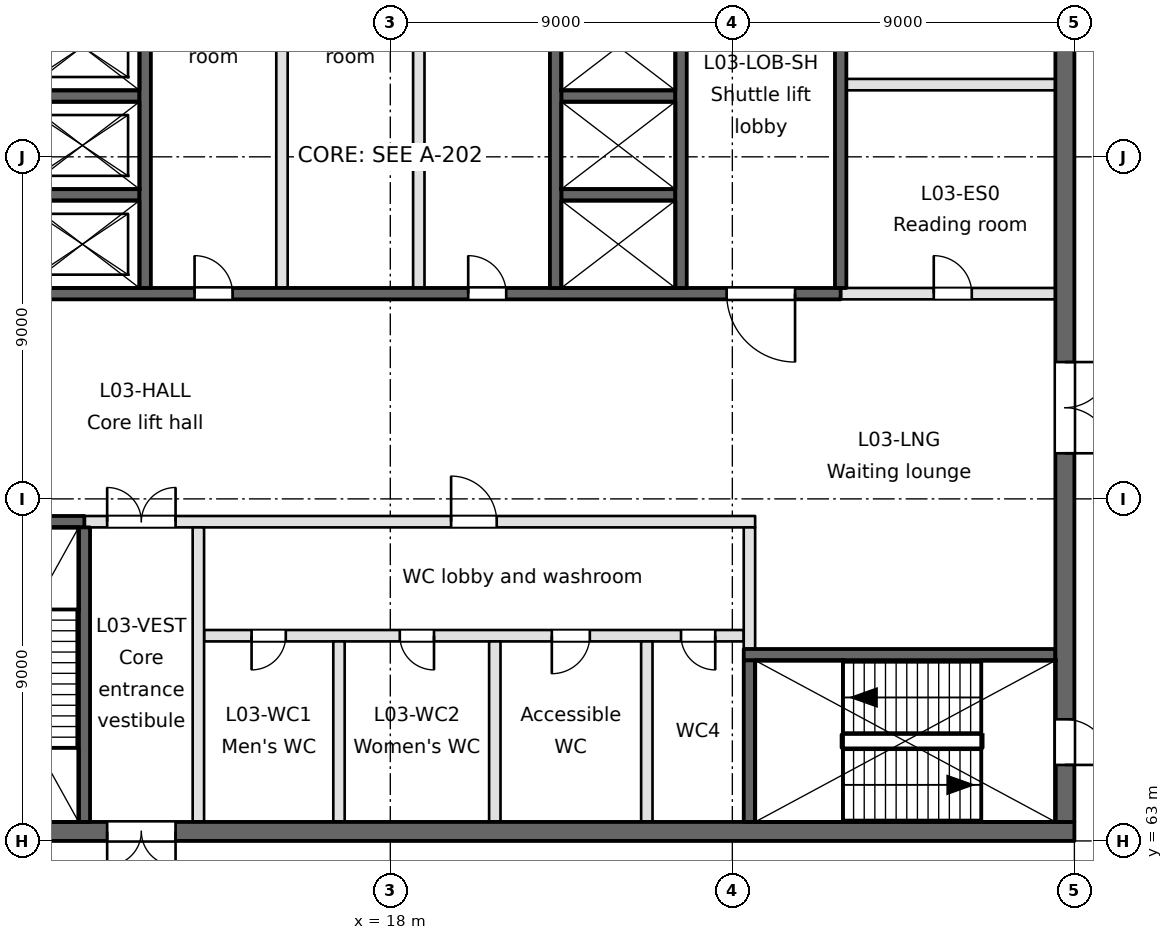
"""IFC4 building model, lengths in metres.
Left out: names, types, materials, properties, quantities, classifications, styles, units other than length and angle.
Written with IfcOpenShell. Run it as: python <this file> out.ifc"""

import sys

from ifc_helpers import new_model, si_unit, direction, frame, frame_2d, origin, place, context, subcontext, project, spatial, rectangle, extrude, element, fill, save


model = new_model("IFC4")
c1 = context("Model", 3, precision=1e-05, world=origin(), true_north=direction((0.0, 1.0)))
c2 = subcontext(c1, "Body", "Model", "MODEL_VIEW")
j1 = project(units=[si_unit("LENGTHUNIT", "METRE"), si_unit("PLANEANGLEUNIT", "RADIAN")], contexts=[c1])
p1 = place(None, origin())
s1 = spatial("IfcSite", under=j1, at=p1, CompositionType="ELEMENT")
p2 = place(p1, origin())
s2 = spatial("IfcBuilding", under=s1, at=p2, CompositionType="ELEMENT")
p3 = place(p2, frame((0.0, 0.0, 16.8)))
s3 = spatial("IfcBuildingStorey", under=s2, at=p3, CompositionType="ELEMENT", Elevation=16.8)
p4 = place(p3, frame((0.9, 63.25, -0.35), z_axis=(0.0, 0.0, 1.0), x_axis=(1.0, 0.0, 0.0)))
e1 = element("IfcWall", 1, at=p4, inside=s3, PredefinedType="SOLIDWALL", context=c2, shape_type="SweptSolid", body=[
    extrude(rectangle(XDim=35.1, YDim=0.5, at=frame_2d((17.55, 0.0))), origin(), (0.0, 0.0, 1.0), 4.8),
])
p5 = place(p4, frame((9.65, 0.0, 0.35)))
e2 = element("IfcOpeningElement", 2, at=p5, cuts=e1, PredefinedType="OPENING", context=c2, shape_type="SweptSolid", body=[
    extrude(rectangle(XDim=1.8, YDim=2.1, at=frame_2d((0.9, 1.05))), frame((0.0, 0.25, 0.0), z_axis=(0.0, -1.0, 0.0), x_axis=(1.0, 0.0, 0.0)), (0.0, 0.0, 1.0), 0.5),
])
p6 = place(p4, frame((1.55, 0.0, 0.35)))
e3 = element("IfcOpeningElement", 3, at=p6, cuts=e1, PredefinedType="OPENING", context=c2, shape_type="SweptSolid", body=[
    extrude(rectangle(XDim=1.2, YDim=2.1, at=frame_2d((0.6, 1.05))), frame((0.0, 0.25, 0.0), z_axis=(0.0, -1.0, 0.0), x_axis=(1.0, 0.0, 0.0)), (0.0, 0.0, 1.0), 0.5),
])
p7 = place(p4, frame((6.15, 0.0, 0.35)))
e4 = element("IfcOpeningElement", 4, at=p7, cuts=e1, PredefinedType="OPENING", context=c2, shape_type="SweptSolid", body=[
    extrude(rectangle(XDim=1.2, YDim=2.1, at=frame_2d((0.6, 1.05))), frame((0.0, 0.25, 0.0), z_axis=(0.0, -1.0, 0.0), x_axis=(1.0, 0.0, 0.0)), (0.0, 0.0, 1.0), 0.5),
])
p8 = place(p3, frame((27.3, 67.9, -0.35), z_axis=(0.0, 0.0, 1.0), x_axis=(1.0, 0.0, 0.0)))
e5 = element("IfcWall", 5, at=p8, inside=s3, PredefinedType="SOLIDWALL", context=c2, shape_type="SweptSolid", body=[
    extrude(rectangle(XDim=8.2, YDim=0.3, at=frame_2d((4.1, 0.0))), origin(), (0.0, 0.0, 1.0), 4.8),
])
p9 = place(p3, frame((13.1, 68.4, 0.0), z_axis=(0.0, 0.0, 1.0), x_axis=(1.0, 0.0, 0.0)))
e6 = element("IfcWall", 6, at=p9, inside=s3, PredefinedType="PARTITIONING", context=c2, shape_type="SweptSolid", body=[
    extrude(rectangle(XDim=14.2, YDim=0.3, at=frame_2d((7.1, 0.0))), origin(), (0.0, 0.0, 1.0), 4.45),
])
p10 = place(p9, frame((1.25, 0.0, 0.0)))
e7 = element("IfcOpeningElement", 7, at=p10, cuts=e6, PredefinedType="OPENING", context=c2, shape_type="SweptSolid", body=[
    extrude(rectangle(XDim=0.9, YDim=2.1, at=frame_2d((0.45, 1.05))), frame((0.0, 0.15, 0.0), z_axis=(0.0, -1.0, 0.0), x_axis=(1.0, 0.0, 0.0)), (0.0, 0.0, 1.0), 0.3),
])
p11 = place(p9, frame((5.15, 0.0, 0.0)))
e8 = element("IfcOpeningElement", 8, at=p11, cuts=e6, PredefinedType="OPENING", context=c2, shape_type="SweptSolid", body=[
    extrude(rectangle(XDim=0.9, YDim=2.1, at=frame_2d((0.45, 1.05))), frame((0.0, 0.15, 0.0), z_axis=(0.0, -1.0, 0.0), x_axis=(1.0, 0.0, 0.0)), (0.0, 0.0, 1.0), 0.3),
])
p12 = place(p9, frame((9.15, 0.0, 0.0)))
e9 = element("IfcOpeningElement", 9, at=p12, cuts=e6, PredefinedType="OPENING", context=c2, shape_type="SweptSolid", body=[
    extrude(rectangle(XDim=1.0, YDim=2.1, at=frame_2d((0.5, 1.05))), frame((0.0, 0.15, 0.0), z_axis=(0.0, -1.0, 0.0), x_axis=(1.0, 0.0, 0.0)), (0.0, 0.0, 1.0), 0.3),
])
p13 = place(p9, frame((12.55, 0.0, 0.0)))
e10 = element("IfcOpeningElement", 10, at=p13, cuts=e6, PredefinedType="OPENING", context=c2, shape_type="SweptSolid", body=[
    extrude(rectangle(XDim=0.9, YDim=2.1, at=frame_2d((0.45, 1.05))), frame((0.0, 0.15, 0.0), z_axis=(0.0, -1.0, 0.0), x_axis=(1.0, 0.0, 0.0)), (0.0, 0.0, 1.0), 0.3),
])
p14 = place(p3, frame((0.9, 71.4, -0.35), z_axis=(0.0, 0.0, 1.0), x_axis=(1.0, 0.0, 0.0)))
e11 = element("IfcWall", 11, at=p14, inside=s3, PredefinedType="SOLIDWALL", context=c2, shape_type="SweptSolid", body=[
    extrude(rectangle(XDim=9.05, YDim=0.3, at=frame_2d((4.525, 0.0))), origin(), (0.0, 0.0, 1.0), 4.8),
])
p15 = place(p3, frame((9.95, 71.4, 0.0), z_axis=(0.0, 0.0, 1.0), x_axis=(1.0, 0.0, 0.0)))
e12 = element("IfcWall", 12, at=p15, inside=s3, PredefinedType="PARTITIONING", context=c2, shape_type="SweptSolid", body=[
    extrude(rectangle(XDim=17.65, YDim=0.3, at=frame_2d((8.825, 0.0))), origin(), (0.0, 0.0, 1.0), 4.45),
])
p16 = place(p15, frame((0.6, 0.0, 0.0)))
e13 = element("IfcOpeningElement", 13, at=p16, cuts=e12, PredefinedType="OPENING", context=c2, shape_type="SweptSolid", body=[
    extrude(rectangle(XDim=1.8, YDim=2.1, at=frame_2d((0.9, 1.05))), frame((0.0, 0.15, 0.0), z_axis=(0.0, -1.0, 0.0), x_axis=(1.0, 0.0, 0.0)), (0.0, 0.0, 1.0), 0.3),
])
p17 = place(p15, frame((9.65, 0.0, 0.0)))
e14 = element("IfcOpeningElement", 14, at=p17, cuts=e12, PredefinedType="OPENING", context=c2, shape_type="SweptSolid", body=[
    extrude(rectangle(XDim=1.2, YDim=2.1, at=frame_2d((0.6, 1.05))), frame((0.0, 0.15, 0.0), z_axis=(0.0, -1.0, 0.0), x_axis=(1.0, 0.0, 0.0)), (0.0, 0.0, 1.0), 0.3),
])
p18 = place(p3, frame((0.9, 77.4, -0.35), z_axis=(0.0, 0.0, 1.0), x_axis=(1.0, 0.0, 0.0)))
e15 = element("IfcWall", 15, at=p18, inside=s3, PredefinedType="SOLIDWALL", context=c2, shape_type="SweptSolid", body=[
    extrude(rectangle(XDim=28.95, YDim=0.3, at=frame_2d((14.475, 0.0))), origin(), (0.0, 0.0, 1.0), 4.8),
])
p19 = place(p18, frame((4.35, 0.0, 0.35)))
e16 = element("IfcOpeningElement", 16, at=p19, cuts=e15, PredefinedType="OPENING", context=c2, shape_type="SweptSolid", body=[
    extrude(rectangle(XDim=1.8, YDim=2.1, at=frame_2d((0.9, 1.05))), frame((0.0, 0.15, 0.0), z_axis=(0.0, -1.0, 0.0), x_axis=(1.0, 0.0, 0.0)), (0.0, 0.0, 1.0), 0.3),
])
p20 = place(p18, frame((25.95, 0.0, 0.35)))
e17 = element("IfcOpeningElement", 17, at=p20, cuts=e15, PredefinedType="OPENING", context=c2, shape_type="SweptSolid", body=[
    extrude(rectangle(XDim=1.8, YDim=2.1, at=frame_2d((0.9, 1.05))), frame((0.0, 0.15, 0.0), z_axis=(0.0, -1.0, 0.0), x_axis=(1.0, 0.0, 0.0)), (0.0, 0.0, 1.0), 0.3),
])
p21 = place(p18, frame((11.95, 0.0, 0.35)))
e18 = element("IfcOpeningElement", 18, at=p21, cuts=e15, PredefinedType="OPENING", context=c2, shape_type="SweptSolid", body=[
    extrude(rectangle(XDim=1.0, YDim=2.1, at=frame_2d((0.5, 1.05))), frame((0.0, 0.15, 0.0), z_axis=(0.0, -1.0, 0.0), x_axis=(1.0, 0.0, 0.0)), (0.0, 0.0, 1.0), 0.3),
])
p22 = place(p18, frame((19.15, 0.0, 0.35)))
e19 = element("IfcOpeningElement", 19, at=p22, cuts=e15, PredefinedType="OPENING", context=c2, shape_type="SweptSolid", body=[
    extrude(rectangle(XDim=1.0, YDim=2.1, at=frame_2d((0.5, 1.05))), frame((0.0, 0.15, 0.0), z_axis=(0.0, -1.0, 0.0), x_axis=(1.0, 0.0, 0.0)), (0.0, 0.0, 1.0), 0.3),
])
p23 = place(p3, frame((29.85, 77.4, 0.0), z_axis=(0.0, 0.0, 1.0), x_axis=(1.0, 0.0, 0.0)))
e20 = element("IfcWall", 20, at=p23, inside=s3, PredefinedType="PARTITIONING", context=c2, shape_type="SweptSolid", body=[
    extrude(rectangle(XDim=5.65, YDim=0.3, at=frame_2d((2.825, 0.0))), origin(), (0.0, 0.0, 1.0), 4.45),
])
p24 = place(p23, frame((2.45, 0.0, 0.0)))
e21 = element("IfcOpeningElement", 21, at=p24, cuts=e20, PredefinedType="OPENING", context=c2, shape_type="SweptSolid", body=[
    extrude(rectangle(XDim=1.0, YDim=2.1, at=frame_2d((0.5, 1.05))), frame((0.0, 0.15, 0.0), z_axis=(0.0, -1.0, 0.0), x_axis=(1.0, 0.0, 0.0)), (0.0, 0.0, 1.0), 0.3),
])
for number, where, z_axis, x_axis in (
    (22, (8.4, 80.0, -0.35), (0.0, 0.0, 1.0), (1.0, 0.0, 0.0)),
    (23, (22.5, 80.0, -0.35), (0.0, 0.0, 1.0), (1.0, 0.0, 0.0)),
    (24, (8.4, 82.6, -0.35), (0.0, 0.0, 1.0), (1.0, 0.0, 0.0)),
    (25, (22.5, 82.6, -0.35), (0.0, 0.0, 1.0), (1.0, 0.0, 0.0)),
):
    element("IfcWall", number, at=place(p3, frame(where, z_axis=z_axis, x_axis=x_axis)), inside=s3, PredefinedType="SOLIDWALL", context=c2, shape_type="SweptSolid", body=[
        extrude(rectangle(XDim=3.0, YDim=0.3, at=frame_2d((1.5, 0.0))), origin(), (0.0, 0.0, 1.0), 4.8),
    ])
p25 = place(p3, frame((30.0, 82.9, 0.0), z_axis=(0.0, 0.0, 1.0), x_axis=(1.0, 0.0, 0.0)))
e26 = element("IfcWall", 26, at=p25, inside=s3, PredefinedType="PARTITIONING", context=c2, shape_type="SweptSolid", body=[
    extrude(rectangle(XDim=5.5, YDim=0.3, at=frame_2d((2.75, 0.0))), origin(), (0.0, 0.0, 1.0), 4.45),
])
p26 = place(p3, frame((9.95, 63.5, -0.35), z_axis=(0.0, 0.0, 1.0), x_axis=(0.0, 1.0, 0.0)))
e27 = element("IfcWall", 27, at=p26, inside=s3, PredefinedType="SOLIDWALL", context=c2, shape_type="SweptSolid", body=[
    extrude(rectangle(XDim=7.75, YDim=0.3, at=frame_2d((3.875, 0.0))), origin(), (0.0, 0.0, 1.0), 4.8),
])
p27 = place(p3, frame((11.55, 77.55, -0.35), z_axis=(0.0, 0.0, 1.0), x_axis=(0.0, 1.0, 0.0)))
e28 = element("IfcWall", 28, at=p27, inside=s3, PredefinedType="SOLIDWALL", context=c2, shape_type="SweptSolid", body=[
    extrude(rectangle(XDim=10.1, YDim=0.3, at=frame_2d((5.05, 0.0))), origin(), (0.0, 0.0, 1.0), 4.8),
])
p28 = place(p3, frame((12.95, 63.5, 0.0), z_axis=(0.0, 0.0, 1.0), x_axis=(0.0, 1.0, 0.0)))
e29 = element("IfcWall", 29, at=p28, inside=s3, PredefinedType="PARTITIONING", context=c2, shape_type="SweptSolid", body=[
    extrude(rectangle(XDim=7.75, YDim=0.3, at=frame_2d((3.875, 0.0))), origin(), (0.0, 0.0, 1.0), 4.45),
])
p29 = place(p3, frame((15.15, 77.55, 0.0), z_axis=(0.0, 0.0, 1.0), x_axis=(0.0, 1.0, 0.0)))
e30 = element("IfcWall", 30, at=p29, inside=s3, PredefinedType="PARTITIONING", context=c2, shape_type="SweptSolid", body=[
    extrude(rectangle(XDim=12.95, YDim=0.3, at=frame_2d((6.475, 0.0))), origin(), (0.0, 0.0, 1.0), 4.45),
])
p30 = place(p3, frame((16.65, 63.5, 0.0), z_axis=(0.0, 0.0, 1.0), x_axis=(0.0, 1.0, 0.0)))
e31 = element("IfcWall", 31, at=p30, inside=s3, PredefinedType="PARTITIONING", context=c2, shape_type="SweptSolid", body=[
    extrude(rectangle(XDim=4.75, YDim=0.3, at=frame_2d((2.375, 0.0))), origin(), (0.0, 0.0, 1.0), 4.45),
])
p31 = place(p3, frame((18.75, 77.55, 0.0), z_axis=(0.0, 0.0, 1.0), x_axis=(0.0, 1.0, 0.0)))
e32 = element("IfcWall", 32, at=p31, inside=s3, PredefinedType="PARTITIONING", context=c2, shape_type="SweptSolid", body=[
    extrude(rectangle(XDim=12.95, YDim=0.3, at=frame_2d((6.475, 0.0))), origin(), (0.0, 0.0, 1.0), 4.45),
])
p32 = place(p3, frame((20.75, 63.5, 0.0), z_axis=(0.0, 0.0, 1.0), x_axis=(0.0, 1.0, 0.0)))
e33 = element("IfcWall", 33, at=p32, inside=s3, PredefinedType="PARTITIONING", context=c2, shape_type="SweptSolid", body=[
    extrude(rectangle(XDim=4.75, YDim=0.3, at=frame_2d((2.375, 0.0))), origin(), (0.0, 0.0, 1.0), 4.45),
])
p33 = place(p3, frame((22.35, 77.55, -0.35), z_axis=(0.0, 0.0, 1.0), x_axis=(0.0, 1.0, 0.0)))
e34 = element("IfcWall", 34, at=p33, inside=s3, PredefinedType="SOLIDWALL", context=c2, shape_type="SweptSolid", body=[
    extrude(rectangle(XDim=10.1, YDim=0.3, at=frame_2d((5.05, 0.0))), origin(), (0.0, 0.0, 1.0), 4.8),
])
p34 = place(p3, frame((24.75, 63.5, 0.0), z_axis=(0.0, 0.0, 1.0), x_axis=(0.0, 1.0, 0.0)))
e35 = element("IfcWall", 35, at=p34, inside=s3, PredefinedType="PARTITIONING", context=c2, shape_type="SweptSolid", body=[
    extrude(rectangle(XDim=4.75, YDim=0.3, at=frame_2d((2.375, 0.0))), origin(), (0.0, 0.0, 1.0), 4.45),
])
p35 = place(p3, frame((25.65, 77.55, -0.35), z_axis=(0.0, 0.0, 1.0), x_axis=(0.0, 1.0, 0.0)))
e36 = element("IfcWall", 36, at=p35, inside=s3, PredefinedType="SOLIDWALL", context=c2, shape_type="SweptSolid", body=[
    extrude(rectangle(XDim=10.1, YDim=0.3, at=frame_2d((5.05, 0.0))), origin(), (0.0, 0.0, 1.0), 4.8),
])
p36 = place(p3, frame((27.45, 63.5, -0.35), z_axis=(0.0, 0.0, 1.0), x_axis=(0.0, 1.0, 0.0)))
e37 = element("IfcWall", 37, at=p36, inside=s3, PredefinedType="SOLIDWALL", context=c2, shape_type="SweptSolid", body=[
    extrude(rectangle(XDim=4.25, YDim=0.3, at=frame_2d((2.125, 0.0))), origin(), (0.0, 0.0, 1.0), 4.8),
])
p37 = place(p3, frame((27.45, 68.05, 0.0), z_axis=(0.0, 0.0, 1.0), x_axis=(0.0, 1.0, 0.0)))
e38 = element("IfcWall", 38, at=p37, inside=s3, PredefinedType="PARTITIONING", context=c2, shape_type="SweptSolid", body=[
    extrude(rectangle(XDim=3.2, YDim=0.3, at=frame_2d((1.6, 0.0))), origin(), (0.0, 0.0, 1.0), 4.45),
])
p38 = place(p3, frame((29.85, 77.55, -0.35), z_axis=(0.0, 0.0, 1.0), x_axis=(0.0, 1.0, 0.0)))
e39 = element("IfcWall", 39, at=p38, inside=s3, PredefinedType="SOLIDWALL", context=c2, shape_type="SweptSolid", body=[
    extrude(rectangle(XDim=10.1, YDim=0.3, at=frame_2d((5.05, 0.0))), origin(), (0.0, 0.0, 1.0), 4.8),
])
p39 = place(p3, frame((35.75, 63.5, -0.35), z_axis=(0.0, 0.0, 1.0), x_axis=(0.0, 1.0, 0.0)))
e40 = element("IfcWall", 40, at=p39, inside=s3, PredefinedType="SOLIDWALL", context=c2, shape_type="SweptSolid", body=[
    extrude(rectangle(XDim=34.6, YDim=0.5, at=frame_2d((17.3, 0.0))), origin(), (0.0, 0.0, 1.0), 4.8),
])
p40 = place(p39, frame((9.7, 0.0, 0.35)))
e41 = element("IfcOpeningElement", 41, at=p40, cuts=e40, PredefinedType="OPENING", context=c2, shape_type="SweptSolid", body=[
    extrude(rectangle(XDim=2.4, YDim=2.1, at=frame_2d((1.2, 1.05))), frame((0.0, 0.25, 0.0), z_axis=(0.0, -1.0, 0.0), x_axis=(1.0, 0.0, 0.0)), (0.0, 0.0, 1.0), 0.5),
])
p41 = place(p39, frame((27.9, 0.0, 0.35)))
e42 = element("IfcOpeningElement", 42, at=p41, cuts=e40, PredefinedType="OPENING", context=c2, shape_type="SweptSolid", body=[
    extrude(rectangle(XDim=1.5, YDim=2.1, at=frame_2d((0.75, 1.05))), frame((0.0, 0.25, 0.0), z_axis=(0.0, -1.0, 0.0), x_axis=(1.0, 0.0, 0.0)), (0.0, 0.0, 1.0), 0.5),
])
p42 = place(p39, frame((1.5, 0.0, 0.35)))
e43 = element("IfcOpeningElement", 43, at=p42, cuts=e40, PredefinedType="OPENING", context=c2, shape_type="SweptSolid", body=[
    extrude(rectangle(XDim=1.2, YDim=2.1, at=frame_2d((0.6, 1.05))), frame((0.0, 0.25, 0.0), z_axis=(0.0, -1.0, 0.0), x_axis=(1.0, 0.0, 0.0)), (0.0, 0.0, 1.0), 0.5),
])
p43 = place(p20, frame((1.8, 0.0, 0.0), z_axis=(0.0, 0.0, 1.0), x_axis=(-1.0, 0.0, 0.0)))
e44 = element("IfcDoor", 44, at=p43, inside=s3, OperationType="SINGLE_SWING_LEFT", PredefinedType="DOOR", context=c2, shape_type="SweptSolid", body=[
    extrude(rectangle(XDim=1.8, YDim=2.1, at=frame_2d((0.9, 1.05))), frame((0.0, 0.025, 0.0), z_axis=(0.0, -1.0, 0.0), x_axis=(1.0, 0.0, 0.0)), (0.0, 0.0, 1.0), 0.05),
])
fill(e17, e44)
p44 = place(p40, frame((2.4, 0.0, 0.0), z_axis=(0.0, 0.0, 1.0), x_axis=(-1.0, 0.0, 0.0)))
e45 = element("IfcDoor", 45, at=p44, inside=s3, OperationType="DOUBLE_DOOR_SINGLE_SWING", PredefinedType="DOOR", context=c2, shape_type="SweptSolid", body=[
    extrude(rectangle(XDim=2.4, YDim=2.1, at=frame_2d((1.2, 1.05))), frame((0.0, 0.025, 0.0), z_axis=(0.0, -1.0, 0.0), x_axis=(1.0, 0.0, 0.0)), (0.0, 0.0, 1.0), 0.05),
])
fill(e41, e45)
p45 = place(p5, frame((1.8, 0.0, 0.0), z_axis=(0.0, 0.0, 1.0), x_axis=(-1.0, 0.0, 0.0)))
e46 = element("IfcDoor", 46, at=p45, inside=s3, OperationType="DOUBLE_DOOR_SINGLE_SWING", PredefinedType="DOOR", context=c2, shape_type="SweptSolid", body=[
    extrude(rectangle(XDim=1.8, YDim=2.1, at=frame_2d((0.9, 1.05))), frame((0.0, 0.025, 0.0), z_axis=(0.0, -1.0, 0.0), x_axis=(1.0, 0.0, 0.0)), (0.0, 0.0, 1.0), 0.05),
])
fill(e2, e46)
p46 = place(p16, origin())
e47 = element("IfcDoor", 47, at=p46, inside=s3, OperationType="DOUBLE_DOOR_SINGLE_SWING", PredefinedType="DOOR", context=c2, shape_type="SweptSolid", body=[
    extrude(rectangle(XDim=1.8, YDim=2.1, at=frame_2d((0.9, 1.05))), frame((0.0, 0.025, 0.0), z_axis=(0.0, -1.0, 0.0), x_axis=(1.0, 0.0, 0.0)), (0.0, 0.0, 1.0), 0.05),
])
fill(e13, e47)
p47 = place(p10, frame((0.9, 0.0, 0.0), z_axis=(0.0, 0.0, 1.0), x_axis=(-1.0, 0.0, 0.0)))
e48 = element("IfcDoor", 48, at=p47, inside=s3, OperationType="SINGLE_SWING_RIGHT", PredefinedType="DOOR", context=c2, shape_type="SweptSolid", body=[
    extrude(rectangle(XDim=0.9, YDim=2.1, at=frame_2d((0.45, 1.05))), frame((0.0, 0.025, 0.0), z_axis=(0.0, -1.0, 0.0), x_axis=(1.0, 0.0, 0.0)), (0.0, 0.0, 1.0), 0.05),
])
fill(e7, e48)
p48 = place(p11, frame((0.9, 0.0, 0.0), z_axis=(0.0, 0.0, 1.0), x_axis=(-1.0, 0.0, 0.0)))
e49 = element("IfcDoor", 49, at=p48, inside=s3, OperationType="SINGLE_SWING_LEFT", PredefinedType="DOOR", context=c2, shape_type="SweptSolid", body=[
    extrude(rectangle(XDim=0.9, YDim=2.1, at=frame_2d((0.45, 1.05))), frame((0.0, 0.025, 0.0), z_axis=(0.0, -1.0, 0.0), x_axis=(1.0, 0.0, 0.0)), (0.0, 0.0, 1.0), 0.05),
])
fill(e8, e49)
p49 = place(p12, frame((1.0, 0.0, 0.0), z_axis=(0.0, 0.0, 1.0), x_axis=(-1.0, 0.0, 0.0)))
e50 = element("IfcDoor", 50, at=p49, inside=s3, OperationType="SINGLE_SWING_RIGHT", PredefinedType="DOOR", context=c2, shape_type="SweptSolid", body=[
    extrude(rectangle(XDim=1.0, YDim=2.1, at=frame_2d((0.5, 1.05))), frame((0.0, 0.025, 0.0), z_axis=(0.0, -1.0, 0.0), x_axis=(1.0, 0.0, 0.0)), (0.0, 0.0, 1.0), 0.05),
])
fill(e9, e50)
p50 = place(p13, frame((0.9, 0.0, 0.0), z_axis=(0.0, 0.0, 1.0), x_axis=(-1.0, 0.0, 0.0)))
e51 = element("IfcDoor", 51, at=p50, inside=s3, OperationType="SINGLE_SWING_LEFT", PredefinedType="DOOR", context=c2, shape_type="SweptSolid", body=[
    extrude(rectangle(XDim=0.9, YDim=2.1, at=frame_2d((0.45, 1.05))), frame((0.0, 0.025, 0.0), z_axis=(0.0, -1.0, 0.0), x_axis=(1.0, 0.0, 0.0)), (0.0, 0.0, 1.0), 0.05),
])
fill(e10, e51)
p51 = place(p17, origin())
e52 = element("IfcDoor", 52, at=p51, inside=s3, OperationType="SINGLE_SWING_LEFT", PredefinedType="DOOR", context=c2, shape_type="SweptSolid", body=[
    extrude(rectangle(XDim=1.2, YDim=2.1, at=frame_2d((0.6, 1.05))), frame((0.0, 0.025, 0.0), z_axis=(0.0, -1.0, 0.0), x_axis=(1.0, 0.0, 0.0)), (0.0, 0.0, 1.0), 0.05),
])
fill(e14, e52)
p52 = place(p42, frame((1.2, 0.0, 0.0), z_axis=(0.0, 0.0, 1.0), x_axis=(-1.0, 0.0, 0.0)))
e53 = element("IfcDoor", 53, at=p52, inside=s3, OperationType="SINGLE_SWING_RIGHT", PredefinedType="DOOR", context=c2, shape_type="SweptSolid", body=[
    extrude(rectangle(XDim=1.2, YDim=2.1, at=frame_2d((0.6, 1.05))), frame((0.0, 0.025, 0.0), z_axis=(0.0, -1.0, 0.0), x_axis=(1.0, 0.0, 0.0)), (0.0, 0.0, 1.0), 0.05),
])
fill(e43, e53)
p53 = place(p21, origin())
e54 = element("IfcDoor", 54, at=p53, inside=s3, OperationType="SINGLE_SWING_LEFT", PredefinedType="DOOR", context=c2, shape_type="SweptSolid", body=[
    extrude(rectangle(XDim=1.0, YDim=2.1, at=frame_2d((0.5, 1.05))), frame((0.0, 0.025, 0.0), z_axis=(0.0, -1.0, 0.0), x_axis=(1.0, 0.0, 0.0)), (0.0, 0.0, 1.0), 0.05),
])
fill(e18, e54)
p54 = place(p22, origin())
e55 = element("IfcDoor", 55, at=p54, inside=s3, OperationType="SINGLE_SWING_LEFT", PredefinedType="DOOR", context=c2, shape_type="SweptSolid", body=[
    extrude(rectangle(XDim=1.0, YDim=2.1, at=frame_2d((0.5, 1.05))), frame((0.0, 0.025, 0.0), z_axis=(0.0, -1.0, 0.0), x_axis=(1.0, 0.0, 0.0)), (0.0, 0.0, 1.0), 0.05),
])
fill(e19, e55)
p55 = place(p24, origin())
e56 = element("IfcDoor", 56, at=p55, inside=s3, OperationType="SINGLE_SWING_LEFT", PredefinedType="DOOR", context=c2, shape_type="SweptSolid", body=[
    extrude(rectangle(XDim=1.0, YDim=2.1, at=frame_2d((0.5, 1.05))), frame((0.0, 0.025, 0.0), z_axis=(0.0, -1.0, 0.0), x_axis=(1.0, 0.0, 0.0)), (0.0, 0.0, 1.0), 0.05),
])
fill(e21, e56)
save(model, sys.argv[1])
